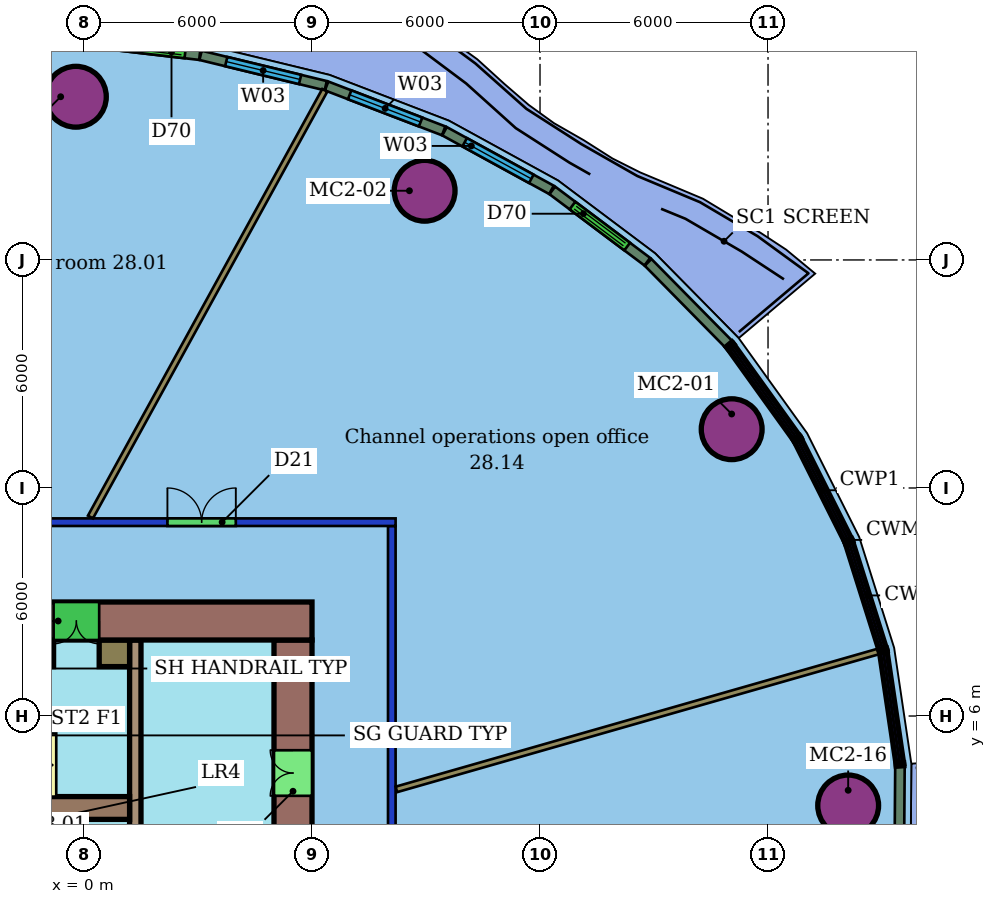
"""IFC4 building model, lengths in metres.
Left out: names, types, materials, properties, quantities, classifications, styles, units other than length and angle.
Written with IfcOpenShell. Run it as: python <this file> out.ifc"""

import sys

from ifc_helpers import new_model, si_unit, direction, frame, frame_2d, origin, origin_2d, place, context, subcontext, project, spatial, rectangle, hollow_circle, extrude, element, fill, save


model = new_model("IFC4")
c1 = context("Model", 3, precision=1e-05, world=origin(), true_north=direction((0.0, 1.0)))
c2 = subcontext(c1, "Body", "Model", "MODEL_VIEW")
j1 = project(units=[si_unit("LENGTHUNIT", "METRE"), si_unit("PLANEANGLEUNIT", "RADIAN")], contexts=[c1])
p1 = place(None, origin())
s1 = spatial("IfcSite", under=j1, at=p1, CompositionType="ELEMENT")
p2 = place(p1, origin())
s2 = spatial("IfcBuilding", under=s1, at=p2, CompositionType="ELEMENT")
p3 = place(p2, frame((0.0, 0.0, 121.0)))
s3 = spatial("IfcBuildingStorey", under=s2, at=p3, CompositionType="ELEMENT", Elevation=121.0)
for number, where, z_axis, x_axis in (
    (1, (17.043, 13.547, 0.0), (0.0, 0.0, 1.0), (1.0, 0.0, 0.0)),
    (2, (8.963, 19.821, 0.0), (0.0, 0.0, 1.0), (1.0, 0.0, 0.0)),
    (3, (-0.213, 22.294, 0.0), (0.0, 0.0, 1.0), (1.0, 0.0, 0.0)),
    (4, (20.109, 3.646, 0.0), (0.0, 0.0, 1.0), (1.0, 0.0, 0.0)),
):
    element("IfcColumn", number, at=place(p3, frame(where, z_axis=z_axis, x_axis=x_axis)), inside=s3, PredefinedType="COLUMN", context=c2, shape_type="SweptSolid", body=[
        extrude(hollow_circle(Radius=0.8, WallThickness=0.055, at=origin_2d()), origin(), (0.0, 0.0, 1.0), 3.45),
    ])
p4 = place(p3, frame((-20.2, 11.1, 0.0), z_axis=(0.0, 0.0, 1.0), x_axis=(1.0, 0.0, 0.0)))
e5 = element("IfcWall", 5, at=p4, inside=s3, PredefinedType="PARTITIONING", context=c2, shape_type="SweptSolid", body=[
    extrude(rectangle(XDim=28.4, YDim=0.2, at=frame_2d((14.2, 0.0))), origin(), (0.0, 0.0, 1.0), 3.0),
])
p5 = place(p4, frame((17.572, 0.0, 0.0)))
e6 = element("IfcOpeningElement", 6, at=p5, cuts=e5, PredefinedType="OPENING", context=c2, shape_type="SweptSolid", body=[
    extrude(rectangle(XDim=1.5, YDim=2.1, at=frame_2d((0.75, 1.05))), frame((0.0, 0.11, 0.0), z_axis=(0.0, -1.0, 0.0), x_axis=(1.0, 0.0, 0.0)), (0.0, 0.0, 1.0), 0.22),
])
p6 = place(p4, frame((11.177, 0.0, 0.0)))
e7 = element("IfcOpeningElement", 7, at=p6, cuts=e5, PredefinedType="OPENING", context=c2, shape_type="SweptSolid", body=[
    extrude(rectangle(XDim=1.0, YDim=2.1, at=frame_2d((0.5, 1.05))), frame((0.0, 0.11, 0.0), z_axis=(0.0, -1.0, 0.0), x_axis=(1.0, 0.0, 0.0)), (0.0, 0.0, 1.0), 0.22),
])
p7 = place(p4, frame((6.349, 0.0, 0.0)))
e8 = element("IfcOpeningElement", 8, at=p7, cuts=e5, PredefinedType="OPENING", context=c2, shape_type="SweptSolid", body=[
    extrude(rectangle(XDim=0.9, YDim=2.1, at=frame_2d((0.45, 1.05))), frame((0.0, 0.11, 0.0), z_axis=(0.0, -1.0, 0.0), x_axis=(1.0, 0.0, 0.0)), (0.0, 0.0, 1.0), 0.22),
])
p8 = place(p4, frame((22.396, 0.0, 0.0)))
e9 = element("IfcOpeningElement", 9, at=p8, cuts=e5, PredefinedType="OPENING", context=c2, shape_type="SweptSolid", body=[
    extrude(rectangle(XDim=1.8, YDim=2.1, at=frame_2d((0.9, 1.05))), frame((0.0, 0.11, 0.0), z_axis=(0.0, -1.0, 0.0), x_axis=(1.0, 0.0, 0.0)), (0.0, 0.0, 1.0), 0.22),
])
p9 = place(p3, frame((8.1, 11.0, 0.0), z_axis=(0.0, 0.0, 1.0), x_axis=(0.0, -1.0, 0.0)))
e10 = element("IfcWall", 10, at=p9, inside=s3, PredefinedType="PARTITIONING", context=c2, shape_type="SweptSolid", body=[
    extrude(rectangle(XDim=22.0, YDim=0.2, at=frame_2d((11.0, 0.0))), origin(), (0.0, 0.0, 1.0), 3.0),
])
p10 = place(p9, frame((14.919, 0.0, 0.0)))
e11 = element("IfcOpeningElement", 11, at=p10, cuts=e10, PredefinedType="OPENING", context=c2, shape_type="SweptSolid", body=[
    extrude(rectangle(XDim=1.0, YDim=2.4, at=frame_2d((0.5, 1.2))), frame((0.0, 0.11, 0.0), z_axis=(0.0, -1.0, 0.0), x_axis=(1.0, 0.0, 0.0)), (0.0, 0.0, 1.0), 0.22),
])
p11 = place(p9, frame((8.285, 0.0, 0.0)))
e12 = element("IfcOpeningElement", 12, at=p11, cuts=e10, PredefinedType="OPENING", context=c2, shape_type="SweptSolid", body=[
    extrude(rectangle(XDim=0.9, YDim=2.1, at=frame_2d((0.45, 1.05))), frame((0.0, 0.11, 0.0), z_axis=(0.0, -1.0, 0.0), x_axis=(1.0, 0.0, 0.0)), (0.0, 0.0, 1.0), 0.22),
])
p12 = place(p3, frame((6.336, 22.463, 0.0), z_axis=(0.0, 0.0, 1.0), x_axis=(-0.481358172348, -0.876523992777, 0.0)))
e13 = element("IfcWall", 13, at=p12, inside=s3, PredefinedType="PARTITIONING", context=c2, shape_type="SweptSolid", body=[
    extrude(rectangle(XDim=12.809, YDim=0.15, at=frame_2d((6.404, 0.0))), origin(), (0.0, 0.0, 1.0), 3.45),
])
p13 = place(p3, frame((20.905, 7.698, 0.0), z_axis=(0.0, 0.0, 1.0), x_axis=(-0.961416334636, -0.275097494528, 0.0)))
e14 = element("IfcWall", 14, at=p13, inside=s3, PredefinedType="PARTITIONING", context=c2, shape_type="SweptSolid", body=[
    extrude(rectangle(XDim=13.193, YDim=0.15, at=frame_2d((6.597, 0.0))), origin(), (0.0, 0.0, 1.0), 3.45),
])
p14 = place(p3, frame((16.961, 15.789, 0.0), z_axis=(0.0, 0.0, 1.0), x_axis=(-0.701948142778, 0.71222805677, 0.0)))
e15 = element("IfcWall", 15, at=p14, inside=s3, PredefinedType="SOLIDWALL", context=c2, shape_type="SweptSolid", body=[
    extrude(rectangle(XDim=3.016, YDim=0.25, at=frame_2d((1.508, 0.0))), origin(), (0.0, 0.0, 1.0), 3.05),
])
p15 = place(p3, frame((14.824, 17.954, 0.0), z_axis=(0.0, 0.0, 1.0), x_axis=(-0.799896906683, 0.60013743316, 0.0)))
e16 = element("IfcWall", 16, at=p15, inside=s3, PredefinedType="SOLIDWALL", context=c2, shape_type="SweptSolid", body=[
    extrude(rectangle(XDim=3.126, YDim=0.25, at=frame_2d((1.563, 0.0))), origin(), (0.0, 0.0, 1.0), 3.05),
])
p16 = place(p15, frame((0.663, 0.0, 0.0)))
e17 = element("IfcOpeningElement", 17, at=p16, cuts=e16, PredefinedType="OPENING", context=c2, shape_type="SweptSolid", body=[
    extrude(rectangle(XDim=1.8, YDim=2.4, at=frame_2d((0.9, 1.2))), frame((0.0, 0.135, 0.0), z_axis=(0.0, -1.0, 0.0), x_axis=(1.0, 0.0, 0.0)), (0.0, 0.0, 1.0), 0.27),
])
p17 = place(p3, frame((12.301, 19.844, 0.0), z_axis=(0.0, 0.0, 1.0), x_axis=(-0.876916884628, 0.480642047114, 0.0)))
e18 = element("IfcWall", 18, at=p17, inside=s3, PredefinedType="SOLIDWALL", context=c2, shape_type="SweptSolid", body=[
    extrude(rectangle(XDim=3.209, YDim=0.25, at=frame_2d((1.604, 0.0))), origin(), (0.0, 0.0, 1.0), 3.05),
])
p18 = place(p17, frame((0.604, 0.0, 0.9)))
e19 = element("IfcOpeningElement", 19, at=p18, cuts=e18, PredefinedType="OPENING", context=c2, shape_type="SweptSolid", body=[
    extrude(rectangle(XDim=2.0, YDim=2.1, at=frame_2d((1.0, 1.05))), frame((0.0, 0.135, 0.0), z_axis=(0.0, -1.0, 0.0), x_axis=(1.0, 0.0, 0.0)), (0.0, 0.0, 1.0), 0.27),
])
p19 = place(p3, frame((9.464, 21.397, 0.0), z_axis=(0.0, 0.0, 1.0), x_axis=(-0.933724677667, 0.357991936103, 0.0)))
e20 = element("IfcWall", 20, at=p19, inside=s3, PredefinedType="SOLIDWALL", context=c2, shape_type="SweptSolid", body=[
    extrude(rectangle(XDim=3.299, YDim=0.25, at=frame_2d((1.649, 0.0))), origin(), (0.0, 0.0, 1.0), 3.05),
])
p20 = place(p19, frame((0.649, 0.0, 0.9)))
e21 = element("IfcOpeningElement", 21, at=p20, cuts=e20, PredefinedType="OPENING", context=c2, shape_type="SweptSolid", body=[
    extrude(rectangle(XDim=2.0, YDim=2.1, at=frame_2d((1.0, 1.05))), frame((0.0, 0.135, 0.0), z_axis=(0.0, -1.0, 0.0), x_axis=(1.0, 0.0, 0.0)), (0.0, 0.0, 1.0), 0.27),
])
p21 = place(p3, frame((6.361, 22.585, 0.0), z_axis=(0.0, 0.0, 1.0), x_axis=(-0.971871596081, 0.235511360088, 0.0)))
e22 = element("IfcWall", 22, at=p21, inside=s3, PredefinedType="SOLIDWALL", context=c2, shape_type="SweptSolid", body=[
    extrude(rectangle(XDim=3.389, YDim=0.25, at=frame_2d((1.694, 0.0))), origin(), (0.0, 0.0, 1.0), 3.05),
])
p22 = place(p21, frame((0.695, 0.0, 0.9)))
e23 = element("IfcOpeningElement", 23, at=p22, cuts=e22, PredefinedType="OPENING", context=c2, shape_type="SweptSolid", body=[
    extrude(rectangle(XDim=2.0, YDim=2.1, at=frame_2d((1.0, 1.05))), frame((0.0, 0.135, 0.0), z_axis=(0.0, -1.0, 0.0), x_axis=(1.0, 0.0, 0.0)), (0.0, 0.0, 1.0), 0.27),
])
p23 = place(p3, frame((3.045, 23.388, 0.0), z_axis=(0.0, 0.0, 1.0), x_axis=(-0.993327429038, 0.115328308409, 0.0)))
e24 = element("IfcWall", 24, at=p23, inside=s3, PredefinedType="SOLIDWALL", context=c2, shape_type="SweptSolid", body=[
    extrude(rectangle(XDim=3.474, YDim=0.25, at=frame_2d((1.737, 0.0))), origin(), (0.0, 0.0, 1.0), 3.05),
])
p24 = place(p23, frame((0.387, 0.0, 0.0)))
e25 = element("IfcOpeningElement", 25, at=p24, cuts=e24, PredefinedType="OPENING", context=c2, shape_type="SweptSolid", body=[
    extrude(rectangle(XDim=1.8, YDim=2.4, at=frame_2d((0.9, 1.2))), frame((0.0, 0.135, 0.0), z_axis=(0.0, -1.0, 0.0), x_axis=(1.0, 0.0, 0.0)), (0.0, 0.0, 1.0), 0.27),
])
p25 = place(p3, frame((21.449, 1.653, 0.0), z_axis=(0.0, 0.0, 1.0), x_axis=(0.007366431712, 0.999972867474, 0.0)))
e26 = element("IfcWall", 26, at=p25, inside=s3, PredefinedType="SOLIDWALL", context=c2, shape_type="SweptSolid", body=[
    extrude(rectangle(XDim=3.016, YDim=0.25, at=frame_2d((1.508, 0.0))), origin(), (0.0, 0.0, 1.0), 3.05),
])
p26 = place(p3, frame((6.0, 8.5, 0.0), z_axis=(0.0, 0.0, 1.0), x_axis=(-1.0, 0.0, 0.0)))
e27 = element("IfcWall", 27, at=p26, inside=s3, PredefinedType="SHEAR", context=c2, shape_type="SweptSolid", body=[
    extrude(rectangle(XDim=12.0, YDim=1.0, at=frame_2d((6.0, 0.0))), origin(), (0.0, 0.0, 1.0), 3.3),
])
p27 = place(p26, frame((5.6, 0.0, 0.0)))
e28 = element("IfcOpeningElement", 28, at=p27, cuts=e27, PredefinedType="OPENING", context=c2, shape_type="SweptSolid", body=[
    extrude(rectangle(XDim=1.2, YDim=2.1, at=frame_2d((0.6, 1.05))), frame((0.0, 0.51, 0.0), z_axis=(0.0, -1.0, 0.0), x_axis=(1.0, 0.0, 0.0)), (0.0, 0.0, 1.0), 1.02),
])
p28 = place(p3, frame((5.5, -8.0, 0.0), z_axis=(0.0, 0.0, 1.0), x_axis=(0.0, 1.0, 0.0)))
e29 = element("IfcWall", 29, at=p28, inside=s3, PredefinedType="SHEAR", context=c2, shape_type="SweptSolid", body=[
    extrude(rectangle(XDim=16.0, YDim=1.0, at=frame_2d((8.0, 0.0))), origin(), (0.0, 0.0, 1.0), 3.3),
])
p29 = place(p28, frame((2.9, 0.0, 0.0)))
e30 = element("IfcOpeningElement", 30, at=p29, cuts=e29, PredefinedType="OPENING", context=c2, shape_type="SweptSolid", body=[
    extrude(rectangle(XDim=1.2, YDim=2.1, at=frame_2d((0.6, 1.05))), frame((0.0, 0.51, 0.0), z_axis=(0.0, -1.0, 0.0), x_axis=(1.0, 0.0, 0.0)), (0.0, 0.0, 1.0), 1.02),
])
p30 = place(p28, frame((11.9, 0.0, 0.0)))
e31 = element("IfcOpeningElement", 31, at=p30, cuts=e29, PredefinedType="OPENING", context=c2, shape_type="SweptSolid", body=[
    extrude(rectangle(XDim=1.2, YDim=2.1, at=frame_2d((0.6, 1.05))), frame((0.0, 0.51, 0.0), z_axis=(0.0, -1.0, 0.0), x_axis=(1.0, 0.0, 0.0)), (0.0, 0.0, 1.0), 1.02),
])
p31 = place(p3, frame((-6.0, 3.58, 0.0), z_axis=(0.0, 0.0, 1.0), x_axis=(1.0, 0.0, 0.0)))
e32 = element("IfcWall", 32, at=p31, inside=s3, PredefinedType="SHEAR", context=c2, shape_type="SweptSolid", body=[
    extrude(rectangle(XDim=7.2, YDim=0.6, at=frame_2d((3.6, 0.0))), origin(), (0.0, 0.0, 1.0), 3.3),
])
p32 = place(p3, frame((1.35, -8.0, 0.0), z_axis=(0.0, 0.0, 1.0), x_axis=(0.0, 1.0, 0.0)))
e33 = element("IfcWall", 33, at=p32, inside=s3, PredefinedType="SHEAR", context=c2, shape_type="SweptSolid", body=[
    extrude(rectangle(XDim=16.0, YDim=0.3, at=frame_2d((8.0, 0.0))), origin(), (0.0, 0.0, 1.0), 3.3),
])
p33 = place(p32, frame((1.91, 0.0, 0.0)))
e34 = element("IfcOpeningElement", 34, at=p33, cuts=e33, PredefinedType="OPENING", context=c2, shape_type="SweptSolid", body=[
    extrude(rectangle(XDim=1.0, YDim=2.1, at=frame_2d((0.5, 1.05))), frame((0.0, 0.16, 0.0), z_axis=(0.0, -1.0, 0.0), x_axis=(1.0, 0.0, 0.0)), (0.0, 0.0, 1.0), 0.32),
])
p34 = place(p32, frame((7.25, 0.0, 0.0)))
e35 = element("IfcOpeningElement", 35, at=p34, cuts=e33, PredefinedType="OPENING", context=c2, shape_type="SweptSolid", body=[
    extrude(rectangle(XDim=1.5, YDim=2.1, at=frame_2d((0.75, 1.05))), frame((0.0, 0.16, 0.0), z_axis=(0.0, -1.0, 0.0), x_axis=(1.0, 0.0, 0.0)), (0.0, 0.0, 1.0), 0.32),
])
p35 = place(p3, frame((-5.85, 7.65, 0.0), z_axis=(0.0, 0.0, 1.0), x_axis=(1.0, 0.0, 0.0)))
e36 = element("IfcWall", 36, at=p35, inside=s3, PredefinedType="SHEAR", context=c2, shape_type="SweptSolid", body=[
    extrude(rectangle(XDim=5.05, YDim=0.7, at=frame_2d((2.525, 0.0))), origin(), (0.0, 0.0, 1.0), 3.3),
])
p36 = place(p3, frame((0.4, 7.65, 0.0), z_axis=(0.0, 0.0, 1.0), x_axis=(1.0, 0.0, 0.0)))
e37 = element("IfcWall", 37, at=p36, inside=s3, PredefinedType="SHEAR", context=c2, shape_type="SweptSolid", body=[
    extrude(rectangle(XDim=0.8, YDim=0.7, at=frame_2d((0.4, 0.0))), origin(), (0.0, 0.0, 1.0), 3.3),
])
p37 = place(p8, origin())
e38 = element("IfcDoor", 38, at=p37, inside=s3, OperationType="DOUBLE_DOOR_SINGLE_SWING", PredefinedType="DOOR", context=c2, shape_type="SweptSolid", body=[
    extrude(rectangle(XDim=1.8, YDim=2.1, at=frame_2d((0.9, 1.05))), frame((0.0, 0.025, 0.0), z_axis=(0.0, -1.0, 0.0), x_axis=(1.0, 0.0, 0.0)), (0.0, 0.0, 1.0), 0.05),
])
fill(e9, e38)
p38 = place(p16, origin())
e39 = element("IfcDoor", 39, at=p38, inside=s3, OperationType="DOUBLE_DOOR_SLIDING", PredefinedType="DOOR", context=c2, shape_type="SweptSolid", body=[
    extrude(rectangle(XDim=1.8, YDim=2.4, at=frame_2d((0.9, 1.2))), frame((0.0, 0.025, 0.0), z_axis=(0.0, -1.0, 0.0), x_axis=(1.0, 0.0, 0.0)), (0.0, 0.0, 1.0), 0.05),
])
fill(e17, e39)
p39 = place(p18, origin())
e40 = element("IfcWindow", 40, at=p39, inside=s3, PartitioningType="SINGLE_PANEL", PredefinedType="WINDOW", context=c2, shape_type="SweptSolid", body=[
    extrude(rectangle(XDim=2.0, YDim=2.1, at=frame_2d((1.0, 1.05))), frame((0.0, 0.03, 0.0), z_axis=(0.0, -1.0, 0.0), x_axis=(1.0, 0.0, 0.0)), (0.0, 0.0, 1.0), 0.06),
])
fill(e19, e40)
p40 = place(p20, origin())
e41 = element("IfcWindow", 41, at=p40, inside=s3, PartitioningType="SINGLE_PANEL", PredefinedType="WINDOW", context=c2, shape_type="SweptSolid", body=[
    extrude(rectangle(XDim=2.0, YDim=2.1, at=frame_2d((1.0, 1.05))), frame((0.0, 0.03, 0.0), z_axis=(0.0, -1.0, 0.0), x_axis=(1.0, 0.0, 0.0)), (0.0, 0.0, 1.0), 0.06),
])
fill(e21, e41)
p41 = place(p22, origin())
e42 = element("IfcWindow", 42, at=p41, inside=s3, PartitioningType="SINGLE_PANEL", PredefinedType="WINDOW", context=c2, shape_type="SweptSolid", body=[
    extrude(rectangle(XDim=2.0, YDim=2.1, at=frame_2d((1.0, 1.05))), frame((0.0, 0.03, 0.0), z_axis=(0.0, -1.0, 0.0), x_axis=(1.0, 0.0, 0.0)), (0.0, 0.0, 1.0), 0.06),
])
fill(e23, e42)
p42 = place(p24, origin())
e43 = element("IfcDoor", 43, at=p42, inside=s3, OperationType="DOUBLE_DOOR_SLIDING", PredefinedType="DOOR", context=c2, shape_type="SweptSolid", body=[
    extrude(rectangle(XDim=1.8, YDim=2.4, at=frame_2d((0.9, 1.2))), frame((0.0, 0.025, 0.0), z_axis=(0.0, -1.0, 0.0), x_axis=(1.0, 0.0, 0.0)), (0.0, 0.0, 1.0), 0.05),
])
fill(e25, e43)
p43 = place(p27, origin())
e44 = element("IfcDoor", 44, at=p43, inside=s3, OperationType="DOUBLE_DOOR_SINGLE_SWING", PredefinedType="NOTDEFINED", context=c2, shape_type="SweptSolid", body=[
    extrude(rectangle(XDim=1.2, YDim=2.1, at=frame_2d((0.6, 1.05))), frame((0.0, 0.025, 0.0), z_axis=(0.0, -1.0, 0.0), x_axis=(1.0, 0.0, 0.0)), (0.0, 0.0, 1.0), 0.05),
])
fill(e28, e44)
p44 = place(p30, origin())
e45 = element("IfcDoor", 45, at=p44, inside=s3, OperationType="DOUBLE_DOOR_SINGLE_SWING", PredefinedType="NOTDEFINED", context=c2, shape_type="SweptSolid", body=[
    extrude(rectangle(XDim=1.2, YDim=2.1, at=frame_2d((0.6, 1.05))), frame((0.0, 0.025, 0.0), z_axis=(0.0, -1.0, 0.0), x_axis=(1.0, 0.0, 0.0)), (0.0, 0.0, 1.0), 0.05),
])
fill(e31, e45)
save(model, sys.argv[1])
